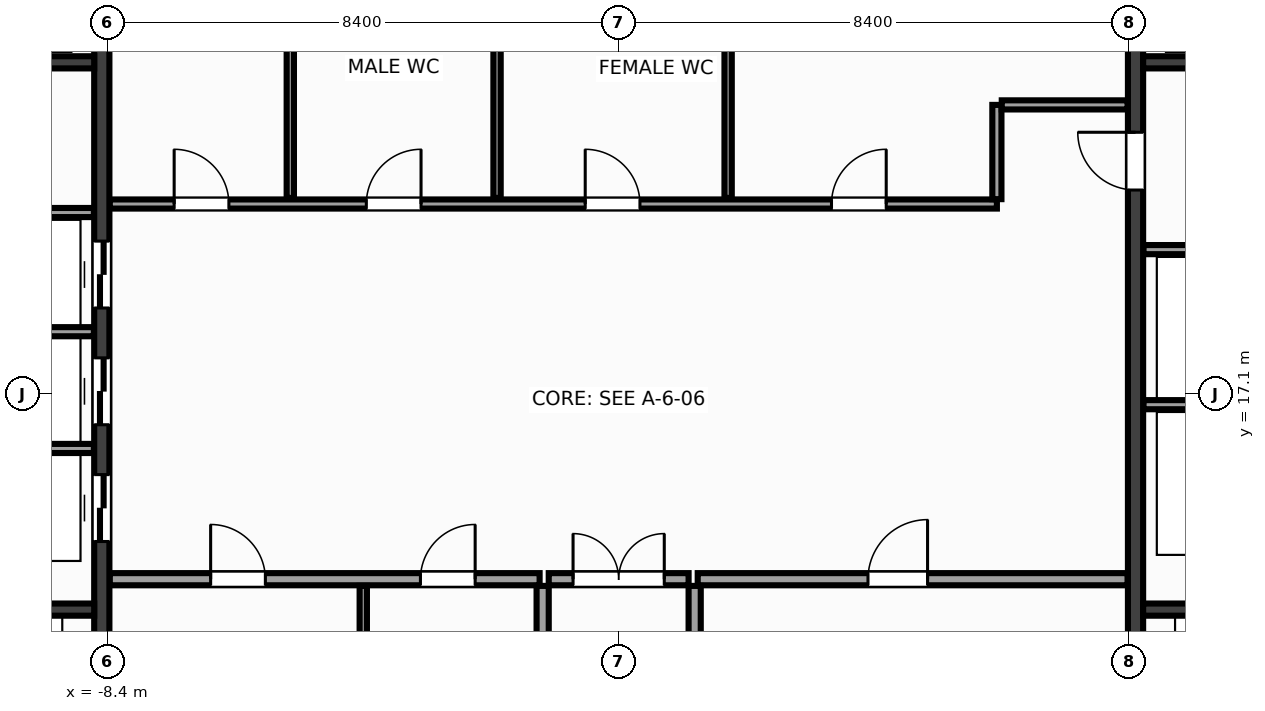
"""IFC4 building model, lengths in metres.
Left out: names, types, materials, properties, quantities, classifications, styles, units other than length and angle.
Written with IfcOpenShell. Run it as: python <this file> out.ifc"""

import sys

from ifc_helpers import new_model, si_unit, direction, frame, frame_2d, origin, place, context, subcontext, project, spatial, rectangle, extrude, source, transform, mapped, element, fill, save


model = new_model("IFC4")
c1 = context("Model", 3, precision=1e-05, world=origin(), true_north=direction((0.0, 1.0)))
c2 = subcontext(c1, "Body", "Model", "MODEL_VIEW")
j1 = project(units=[si_unit("LENGTHUNIT", "METRE"), si_unit("PLANEANGLEUNIT", "RADIAN")], contexts=[c1])
p1 = place(None, origin())
s1 = spatial("IfcSite", under=j1, at=p1, CompositionType="ELEMENT")
p2 = place(p1, origin())
s2 = spatial("IfcBuilding", under=s1, at=p2, CompositionType="ELEMENT")
p3 = place(p2, frame((0.0, 0.0, 275.6)))
s3 = spatial("IfcBuildingStorey", under=s2, at=p3, CompositionType="ELEMENT", Elevation=275.6)
m1 = source(origin(), c2, "Body", "SweptSolid", [
    extrude(rectangle(XDim=13.1, YDim=0.25, at=frame_2d((6.55, 0.0))), origin(), (0.0, 0.0, 1.0), 3.6),
])
p4 = place(p3, frame((-8.5, 10.45, 0.0), z_axis=(0.0, 0.0, 1.0), x_axis=(0.0, 1.0, 0.0)))
e1 = element("IfcWall", 1, at=p4, inside=s3, PredefinedType="SHEAR", context=c2, shape_type="MappedRepresentation", body=[
    mapped(m1, transform((0.0, 0.0, 0.0), x_axis=(1.0, 0.0, 0.0), y_axis=(0.0, 1.0, 0.0), z_axis=(0.0, 0.0, 1.0), scale=1.0)),
])
p5 = place(p4, frame((4.22, 0.0, 0.0)))
e2 = element("IfcOpeningElement", 2, at=p5, cuts=e1, PredefinedType="OPENING", context=c2, shape_type="SweptSolid", body=[
    extrude(rectangle(XDim=1.1, YDim=2.15, at=frame_2d((0.55, 1.075))), frame((0.0, 0.137, 0.0), z_axis=(0.0, -1.0, 0.0), x_axis=(1.0, 0.0, 0.0)), (0.0, 0.0, 1.0), 0.274),
])
p6 = place(p4, frame((6.14, 0.0, 0.0)))
e3 = element("IfcOpeningElement", 3, at=p6, cuts=e1, PredefinedType="OPENING", context=c2, shape_type="SweptSolid", body=[
    extrude(rectangle(XDim=1.1, YDim=2.15, at=frame_2d((0.55, 1.075))), frame((0.0, 0.137, 0.0), z_axis=(0.0, -1.0, 0.0), x_axis=(1.0, 0.0, 0.0)), (0.0, 0.0, 1.0), 0.274),
])
p7 = place(p4, frame((8.06, 0.0, 0.0)))
e4 = element("IfcOpeningElement", 4, at=p7, cuts=e1, PredefinedType="OPENING", context=c2, shape_type="SweptSolid", body=[
    extrude(rectangle(XDim=1.1, YDim=2.15, at=frame_2d((0.55, 1.075))), frame((0.0, 0.137, 0.0), z_axis=(0.0, -1.0, 0.0), x_axis=(1.0, 0.0, 0.0)), (0.0, 0.0, 1.0), 0.274),
])
p8 = place(p3, frame((8.5, 10.45, 0.0), z_axis=(0.0, 0.0, 1.0), x_axis=(0.0, 1.0, 0.0)))
e5 = element("IfcWall", 5, at=p8, inside=s3, PredefinedType="SHEAR", context=c2, shape_type="MappedRepresentation", body=[
    mapped(m1, transform((0.0, 0.0, 0.0), x_axis=(1.0, 0.0, 0.0), y_axis=(0.0, 1.0, 0.0), z_axis=(0.0, 0.0, 1.0), scale=1.0)),
])
p9 = place(p8, frame((10.0, 0.0, 0.0)))
e6 = element("IfcOpeningElement", 6, at=p9, cuts=e5, PredefinedType="OPENING", context=c2, shape_type="SweptSolid", body=[
    extrude(rectangle(XDim=0.95, YDim=2.15, at=frame_2d((0.475, 1.075))), frame((0.0, 0.137, 0.0), z_axis=(0.0, -1.0, 0.0), x_axis=(1.0, 0.0, 0.0)), (0.0, 0.0, 1.0), 0.274),
])
m2 = source(origin(), c2, "Body", "SweptSolid", [
    extrude(rectangle(XDim=2.825, YDim=0.2, at=frame_2d((1.413, 0.0))), origin(), (0.0, 0.0, 1.0), 3.6),
])
for number, where, z_axis, x_axis in (
    (7, (-11.45, 13.55, 0.0), (0.0, 0.0, 1.0), (1.0, 0.0, 0.0)),
    (8, (8.625, 13.55, 0.0), (0.0, 0.0, 1.0), (1.0, 0.0, 0.0)),
):
    element("IfcWall", number, at=place(p3, frame(where, z_axis=z_axis, x_axis=x_axis)), inside=s3, PredefinedType="SHEAR", context=c2, shape_type="MappedRepresentation", body=[
        mapped(m2, transform((0.0, 0.0, 0.0), x_axis=(1.0, 0.0, 0.0), y_axis=(0.0, 1.0, 0.0), z_axis=(0.0, 0.0, 1.0), scale=1.0)),
    ])
m3 = source(origin(), c2, "Body", "SweptSolid", [
    extrude(rectangle(XDim=3.02, YDim=0.2, at=frame_2d((1.51, 0.0))), origin(), (0.0, 0.0, 1.0), 3.6),
])
for number, where, z_axis, x_axis in (
    (9, (-11.645, 22.55, 0.0), (0.0, 0.0, 1.0), (1.0, 0.0, 0.0)),
    (10, (8.625, 22.55, 0.0), (0.0, 0.0, 1.0), (1.0, 0.0, 0.0)),
):
    element("IfcWall", number, at=place(p3, frame(where, z_axis=z_axis, x_axis=x_axis)), inside=s3, PredefinedType="SHEAR", context=c2, shape_type="MappedRepresentation", body=[
        mapped(m3, transform((0.0, 0.0, 0.0), x_axis=(1.0, 0.0, 0.0), y_axis=(0.0, 1.0, 0.0), z_axis=(0.0, 0.0, 1.0), scale=1.0)),
    ])
m4 = source(origin(), c2, "Body", "SweptSolid", [
    extrude(rectangle(XDim=3.01, YDim=0.15, at=frame_2d((1.505, 0.0))), origin(), (0.0, 0.0, 1.0), 3.37),
])
for number, where, z_axis, x_axis in (
    (11, (-11.64, 16.2, 0.0), (0.0, 0.0, 1.0), (1.0, 0.0, 0.0)),
    (12, (-11.64, 18.12, 0.0), (0.0, 0.0, 1.0), (1.0, 0.0, 0.0)),
    (13, (-11.64, 20.08, 0.0), (0.0, 0.0, 1.0), (1.0, 0.0, 0.0)),
    (14, (8.63, 16.92, 0.0), (0.0, 0.0, 1.0), (1.0, 0.0, 0.0)),
    (15, (8.63, 19.47, 0.0), (0.0, 0.0, 1.0), (1.0, 0.0, 0.0)),
):
    element("IfcWall", number, at=place(p3, frame(where, z_axis=z_axis, x_axis=x_axis)), inside=s3, PredefinedType="PARTITIONING", context=c2, shape_type="MappedRepresentation", body=[
        mapped(m4, transform((0.0, 0.0, 0.0), x_axis=(1.0, 0.0, 0.0), y_axis=(0.0, 1.0, 0.0), z_axis=(0.0, 0.0, 1.0), scale=1.0)),
    ])
m5 = source(origin(), c2, "Body", "SweptSolid", [
    extrude(rectangle(XDim=7.07, YDim=0.2, at=frame_2d((3.535, 0.0))), origin(), (0.0, 0.0, 1.0), 3.37),
])
p10 = place(p3, frame((-8.37, 14.05, 0.0), z_axis=(0.0, 0.0, 1.0), x_axis=(1.0, 0.0, 0.0)))
e16 = element("IfcWall", 16, at=p10, inside=s3, PredefinedType="PARTITIONING", context=c2, shape_type="MappedRepresentation", body=[
    mapped(m5, transform((0.0, 0.0, 0.0), x_axis=(1.0, 0.0, 0.0), y_axis=(0.0, 1.0, 0.0), z_axis=(0.0, 0.0, 1.0), scale=1.0)),
])
p11 = place(p10, frame((1.66, 0.0, 0.0)))
e17 = element("IfcOpeningElement", 17, at=p11, cuts=e16, PredefinedType="OPENING", context=c2, shape_type="SweptSolid", body=[
    extrude(rectangle(XDim=0.9, YDim=2.15, at=frame_2d((0.45, 1.075))), frame((0.0, 0.112, 0.0), z_axis=(0.0, -1.0, 0.0), x_axis=(1.0, 0.0, 0.0)), (0.0, 0.0, 1.0), 0.224),
])
p12 = place(p10, frame((5.11, 0.0, 0.0)))
e18 = element("IfcOpeningElement", 18, at=p12, cuts=e16, PredefinedType="OPENING", context=c2, shape_type="SweptSolid", body=[
    extrude(rectangle(XDim=0.9, YDim=2.15, at=frame_2d((0.45, 1.075))), frame((0.0, 0.112, 0.0), z_axis=(0.0, -1.0, 0.0), x_axis=(1.0, 0.0, 0.0)), (0.0, 0.0, 1.0), 0.224),
])
p13 = place(p3, frame((1.3, 14.05, 0.0), z_axis=(0.0, 0.0, 1.0), x_axis=(1.0, 0.0, 0.0)))
e19 = element("IfcWall", 19, at=p13, inside=s3, PredefinedType="PARTITIONING", context=c2, shape_type="MappedRepresentation", body=[
    mapped(m5, transform((0.0, 0.0, 0.0), x_axis=(1.0, 0.0, 0.0), y_axis=(0.0, 1.0, 0.0), z_axis=(0.0, 0.0, 1.0), scale=1.0)),
])
p14 = place(p13, frame((2.8, 0.0, 0.0)))
e20 = element("IfcOpeningElement", 20, at=p14, cuts=e19, PredefinedType="OPENING", context=c2, shape_type="SweptSolid", body=[
    extrude(rectangle(XDim=0.98, YDim=2.15, at=frame_2d((0.49, 1.075))), frame((0.0, 0.112, 0.0), z_axis=(0.0, -1.0, 0.0), x_axis=(1.0, 0.0, 0.0)), (0.0, 0.0, 1.0), 0.224),
])
m6 = source(origin(), c2, "Body", "SweptSolid", [
    extrude(rectangle(XDim=3.49, YDim=0.2, at=frame_2d((1.745, 0.0))), origin(), (0.0, 0.0, 1.0), 3.37),
])
for number, where, z_axis, x_axis in (
    (21, (-1.25, 10.45, 0.0), (0.0, 0.0, 1.0), (0.0, 1.0, 0.0)),
    (22, (1.25, 10.45, 0.0), (0.0, 0.0, 1.0), (0.0, 1.0, 0.0)),
):
    element("IfcWall", number, at=place(p3, frame(where, z_axis=z_axis, x_axis=x_axis)), inside=s3, PredefinedType="PARTITIONING", context=c2, shape_type="MappedRepresentation", body=[
        mapped(m6, transform((0.0, 0.0, 0.0), x_axis=(1.0, 0.0, 0.0), y_axis=(0.0, 1.0, 0.0), z_axis=(0.0, 0.0, 1.0), scale=1.0)),
    ])
m7 = source(origin(), c2, "Body", "SweptSolid", [
    extrude(rectangle(XDim=2.3, YDim=0.2, at=frame_2d((1.15, 0.0))), origin(), (0.0, 0.0, 1.0), 3.37),
])
p15 = place(p3, frame((-1.15, 14.05, 0.0), z_axis=(0.0, 0.0, 1.0), x_axis=(1.0, 0.0, 0.0)))
e23 = element("IfcWall", 23, at=p15, inside=s3, PredefinedType="PARTITIONING", context=c2, shape_type="MappedRepresentation", body=[
    mapped(m7, transform((0.0, 0.0, 0.0), x_axis=(1.0, 0.0, 0.0), y_axis=(0.0, 1.0, 0.0), z_axis=(0.0, 0.0, 1.0), scale=1.0)),
])
p16 = place(p15, frame((0.4, 0.0, 0.0)))
e24 = element("IfcOpeningElement", 24, at=p16, cuts=e23, PredefinedType="OPENING", context=c2, shape_type="SweptSolid", body=[
    extrude(rectangle(XDim=1.5, YDim=2.2, at=frame_2d((0.75, 1.1))), frame((0.0, 0.112, 0.0), z_axis=(0.0, -1.0, 0.0), x_axis=(1.0, 0.0, 0.0)), (0.0, 0.0, 1.0), 0.224),
])
m8 = source(origin(), c2, "Body", "SweptSolid", [
    extrude(rectangle(XDim=14.59, YDim=0.15, at=frame_2d((7.295, 0.0))), origin(), (0.0, 0.0, 1.0), 3.37),
])
p17 = place(p3, frame((-8.37, 20.22, 0.0), z_axis=(0.0, 0.0, 1.0), x_axis=(1.0, 0.0, 0.0)))
e25 = element("IfcWall", 25, at=p17, inside=s3, PredefinedType="PARTITIONING", context=c2, shape_type="MappedRepresentation", body=[
    mapped(m8, transform((0.0, 0.0, 0.0), x_axis=(1.0, 0.0, 0.0), y_axis=(0.0, 1.0, 0.0), z_axis=(0.0, 0.0, 1.0), scale=1.0)),
])
p18 = place(p17, frame((1.06, 0.0, 0.0)))
e26 = element("IfcOpeningElement", 26, at=p18, cuts=e25, PredefinedType="OPENING", context=c2, shape_type="SweptSolid", body=[
    extrude(rectangle(XDim=0.9, YDim=2.15, at=frame_2d((0.45, 1.075))), frame((0.0, 0.087, 0.0), z_axis=(0.0, -1.0, 0.0), x_axis=(1.0, 0.0, 0.0)), (0.0, 0.0, 1.0), 0.174),
])
p19 = place(p17, frame((4.22, 0.0, 0.0)))
e27 = element("IfcOpeningElement", 27, at=p19, cuts=e25, PredefinedType="OPENING", context=c2, shape_type="SweptSolid", body=[
    extrude(rectangle(XDim=0.9, YDim=2.15, at=frame_2d((0.45, 1.075))), frame((0.0, 0.087, 0.0), z_axis=(0.0, -1.0, 0.0), x_axis=(1.0, 0.0, 0.0)), (0.0, 0.0, 1.0), 0.174),
])
p20 = place(p17, frame((7.82, 0.0, 0.0)))
e28 = element("IfcOpeningElement", 28, at=p20, cuts=e25, PredefinedType="OPENING", context=c2, shape_type="SweptSolid", body=[
    extrude(rectangle(XDim=0.9, YDim=2.15, at=frame_2d((0.45, 1.075))), frame((0.0, 0.087, 0.0), z_axis=(0.0, -1.0, 0.0), x_axis=(1.0, 0.0, 0.0)), (0.0, 0.0, 1.0), 0.174),
])
p21 = place(p17, frame((11.87, 0.0, 0.0)))
e29 = element("IfcOpeningElement", 29, at=p21, cuts=e25, PredefinedType="OPENING", context=c2, shape_type="SweptSolid", body=[
    extrude(rectangle(XDim=0.9, YDim=2.15, at=frame_2d((0.45, 1.075))), frame((0.0, 0.087, 0.0), z_axis=(0.0, -1.0, 0.0), x_axis=(1.0, 0.0, 0.0)), (0.0, 0.0, 1.0), 0.174),
])
m9 = source(origin(), c2, "Body", "SweptSolid", [
    extrude(rectangle(XDim=1.55, YDim=0.15, at=frame_2d((0.775, 0.0))), origin(), (0.0, 0.0, 1.0), 3.37),
])
p22 = place(p3, frame((6.22, 20.3, 0.0), z_axis=(0.0, 0.0, 1.0), x_axis=(0.0, 1.0, 0.0)))
e30 = element("IfcWall", 30, at=p22, inside=s3, PredefinedType="PARTITIONING", context=c2, shape_type="MappedRepresentation", body=[
    mapped(m9, transform((0.0, 0.0, 0.0), x_axis=(1.0, 0.0, 0.0), y_axis=(0.0, 1.0, 0.0), z_axis=(0.0, 0.0, 1.0), scale=1.0)),
])
m10 = source(origin(), c2, "Body", "SweptSolid", [
    extrude(rectangle(XDim=2.07, YDim=0.15, at=frame_2d((1.035, 0.0))), origin(), (0.0, 0.0, 1.0), 3.37),
])
p23 = place(p3, frame((6.3, 21.85, 0.0), z_axis=(0.0, 0.0, 1.0), x_axis=(1.0, 0.0, 0.0)))
e31 = element("IfcWall", 31, at=p23, inside=s3, PredefinedType="PARTITIONING", context=c2, shape_type="MappedRepresentation", body=[
    mapped(m10, transform((0.0, 0.0, 0.0), x_axis=(1.0, 0.0, 0.0), y_axis=(0.0, 1.0, 0.0), z_axis=(0.0, 0.0, 1.0), scale=1.0)),
])
m11 = source(origin(), c2, "Body", "SweptSolid", [
    extrude(rectangle(XDim=3.49, YDim=0.12, at=frame_2d((1.745, 0.0))), origin(), (0.0, 0.0, 1.0), 3.37),
])
p24 = place(p3, frame((-4.2, 10.45, 0.0), z_axis=(0.0, 0.0, 1.0), x_axis=(0.0, 1.0, 0.0)))
e32 = element("IfcWall", 32, at=p24, inside=s3, PredefinedType="PARTITIONING", context=c2, shape_type="MappedRepresentation", body=[
    mapped(m11, transform((0.0, 0.0, 0.0), x_axis=(1.0, 0.0, 0.0), y_axis=(0.0, 1.0, 0.0), z_axis=(0.0, 0.0, 1.0), scale=1.0)),
])
m12 = source(origin(), c2, "Body", "SweptSolid", [
    extrude(rectangle(XDim=3.19, YDim=0.12, at=frame_2d((1.595, 0.0))), origin(), (0.0, 0.0, 1.0), 3.37),
])
for number, where, z_axis, x_axis in (
    (33, (-5.4, 20.32, 0.0), (0.0, 0.0, 1.0), (0.0, 1.0, 0.0)),
    (34, (-2.0, 20.32, 0.0), (0.0, 0.0, 1.0), (0.0, 1.0, 0.0)),
    (35, (1.8, 20.32, 0.0), (0.0, 0.0, 1.0), (0.0, 1.0, 0.0)),
):
    element("IfcWall", number, at=place(p3, frame(where, z_axis=z_axis, x_axis=x_axis)), inside=s3, PredefinedType="PARTITIONING", context=c2, shape_type="MappedRepresentation", body=[
        mapped(m12, transform((0.0, 0.0, 0.0), x_axis=(1.0, 0.0, 0.0), y_axis=(0.0, 1.0, 0.0), z_axis=(0.0, 0.0, 1.0), scale=1.0)),
    ])
m13 = source(origin(), c2, "Body", "SweptSolid", [
    extrude(rectangle(XDim=1.1, YDim=2.15, at=frame_2d((0.55, 1.075))), frame((0.0, 0.025, 0.0), z_axis=(0.0, -1.0, 0.0), x_axis=(1.0, 0.0, 0.0)), (0.0, 0.0, 1.0), 0.05),
])
p25 = place(p5, origin())
e36 = element("IfcDoor", 36, at=p25, inside=s3, OperationType="DOUBLE_DOOR_SLIDING", PredefinedType="DOOR", context=c2, shape_type="MappedRepresentation", body=[
    mapped(m13, transform((0.0, 0.0, 0.0), x_axis=(1.0, 0.0, 0.0), y_axis=(0.0, 1.0, 0.0), z_axis=(0.0, 0.0, 1.0), scale=1.0)),
])
fill(e2, e36)
p26 = place(p6, origin())
e37 = element("IfcDoor", 37, at=p26, inside=s3, OperationType="DOUBLE_DOOR_SLIDING", PredefinedType="DOOR", context=c2, shape_type="MappedRepresentation", body=[
    mapped(m13, transform((0.0, 0.0, 0.0), x_axis=(1.0, 0.0, 0.0), y_axis=(0.0, 1.0, 0.0), z_axis=(0.0, 0.0, 1.0), scale=1.0)),
])
fill(e3, e37)
p27 = place(p7, origin())
e38 = element("IfcDoor", 38, at=p27, inside=s3, OperationType="DOUBLE_DOOR_SLIDING", PredefinedType="DOOR", context=c2, shape_type="MappedRepresentation", body=[
    mapped(m13, transform((0.0, 0.0, 0.0), x_axis=(1.0, 0.0, 0.0), y_axis=(0.0, 1.0, 0.0), z_axis=(0.0, 0.0, 1.0), scale=1.0)),
])
fill(e4, e38)
m14 = source(origin(), c2, "Body", "SweptSolid", [
    extrude(rectangle(XDim=0.95, YDim=2.15, at=frame_2d((0.475, 1.075))), frame((0.0, 0.025, 0.0), z_axis=(0.0, -1.0, 0.0), x_axis=(1.0, 0.0, 0.0)), (0.0, 0.0, 1.0), 0.05),
])
p28 = place(p9, origin())
e39 = element("IfcDoor", 39, at=p28, inside=s3, OperationType="SINGLE_SWING_RIGHT", PredefinedType="DOOR", context=c2, shape_type="MappedRepresentation", body=[
    mapped(m14, transform((0.0, 0.0, 0.0), x_axis=(1.0, 0.0, 0.0), y_axis=(0.0, 1.0, 0.0), z_axis=(0.0, 0.0, 1.0), scale=1.0)),
])
fill(e6, e39)
m15 = source(origin(), c2, "Body", "SweptSolid", [
    extrude(rectangle(XDim=0.9, YDim=2.15, at=frame_2d((0.45, 1.075))), frame((0.0, 0.025, 0.0), z_axis=(0.0, -1.0, 0.0), x_axis=(1.0, 0.0, 0.0)), (0.0, 0.0, 1.0), 0.05),
])
p29 = place(p11, origin())
e40 = element("IfcDoor", 40, at=p29, inside=s3, OperationType="SINGLE_SWING_LEFT", PredefinedType="DOOR", context=c2, shape_type="MappedRepresentation", body=[
    mapped(m15, transform((0.0, 0.0, 0.0), x_axis=(1.0, 0.0, 0.0), y_axis=(0.0, 1.0, 0.0), z_axis=(0.0, 0.0, 1.0), scale=1.0)),
])
fill(e17, e40)
p30 = place(p12, origin())
e41 = element("IfcDoor", 41, at=p30, inside=s3, OperationType="SINGLE_SWING_RIGHT", PredefinedType="DOOR", context=c2, shape_type="MappedRepresentation", body=[
    mapped(m15, transform((0.0, 0.0, 0.0), x_axis=(1.0, 0.0, 0.0), y_axis=(0.0, 1.0, 0.0), z_axis=(0.0, 0.0, 1.0), scale=1.0)),
])
fill(e18, e41)
m16 = source(origin(), c2, "Body", "SweptSolid", [
    extrude(rectangle(XDim=0.98, YDim=2.15, at=frame_2d((0.49, 1.075))), frame((0.0, 0.025, 0.0), z_axis=(0.0, -1.0, 0.0), x_axis=(1.0, 0.0, 0.0)), (0.0, 0.0, 1.0), 0.05),
])
p31 = place(p14, origin())
e42 = element("IfcDoor", 42, at=p31, inside=s3, OperationType="SINGLE_SWING_RIGHT", PredefinedType="DOOR", context=c2, shape_type="MappedRepresentation", body=[
    mapped(m16, transform((0.0, 0.0, 0.0), x_axis=(1.0, 0.0, 0.0), y_axis=(0.0, 1.0, 0.0), z_axis=(0.0, 0.0, 1.0), scale=1.0)),
])
fill(e20, e42)
m17 = source(origin(), c2, "Body", "SweptSolid", [
    extrude(rectangle(XDim=1.5, YDim=2.2, at=frame_2d((0.75, 1.1))), frame((0.0, 0.025, 0.0), z_axis=(0.0, -1.0, 0.0), x_axis=(1.0, 0.0, 0.0)), (0.0, 0.0, 1.0), 0.05),
])
p32 = place(p16, origin())
e43 = element("IfcDoor", 43, at=p32, inside=s3, OperationType="DOUBLE_DOOR_SINGLE_SWING", PredefinedType="DOOR", context=c2, shape_type="MappedRepresentation", body=[
    mapped(m17, transform((0.0, 0.0, 0.0), x_axis=(1.0, 0.0, 0.0), y_axis=(0.0, 1.0, 0.0), z_axis=(0.0, 0.0, 1.0), scale=1.0)),
])
fill(e24, e43)
p33 = place(p18, origin())
e44 = element("IfcDoor", 44, at=p33, inside=s3, OperationType="SINGLE_SWING_LEFT", PredefinedType="DOOR", context=c2, shape_type="MappedRepresentation", body=[
    mapped(m15, transform((0.0, 0.0, 0.0), x_axis=(1.0, 0.0, 0.0), y_axis=(0.0, 1.0, 0.0), z_axis=(0.0, 0.0, 1.0), scale=1.0)),
])
fill(e26, e44)
p34 = place(p19, origin())
e45 = element("IfcDoor", 45, at=p34, inside=s3, OperationType="SINGLE_SWING_RIGHT", PredefinedType="DOOR", context=c2, shape_type="MappedRepresentation", body=[
    mapped(m15, transform((0.0, 0.0, 0.0), x_axis=(1.0, 0.0, 0.0), y_axis=(0.0, 1.0, 0.0), z_axis=(0.0, 0.0, 1.0), scale=1.0)),
])
fill(e27, e45)
p35 = place(p20, origin())
e46 = element("IfcDoor", 46, at=p35, inside=s3, OperationType="SINGLE_SWING_LEFT", PredefinedType="DOOR", context=c2, shape_type="MappedRepresentation", body=[
    mapped(m15, transform((0.0, 0.0, 0.0), x_axis=(1.0, 0.0, 0.0), y_axis=(0.0, 1.0, 0.0), z_axis=(0.0, 0.0, 1.0), scale=1.0)),
])
fill(e28, e46)
p36 = place(p21, origin())
e47 = element("IfcDoor", 47, at=p36, inside=s3, OperationType="SINGLE_SWING_RIGHT", PredefinedType="DOOR", context=c2, shape_type="MappedRepresentation", body=[
    mapped(m15, transform((0.0, 0.0, 0.0), x_axis=(1.0, 0.0, 0.0), y_axis=(0.0, 1.0, 0.0), z_axis=(0.0, 0.0, 1.0), scale=1.0)),
])
fill(e29, e47)
save(model, sys.argv[1])
